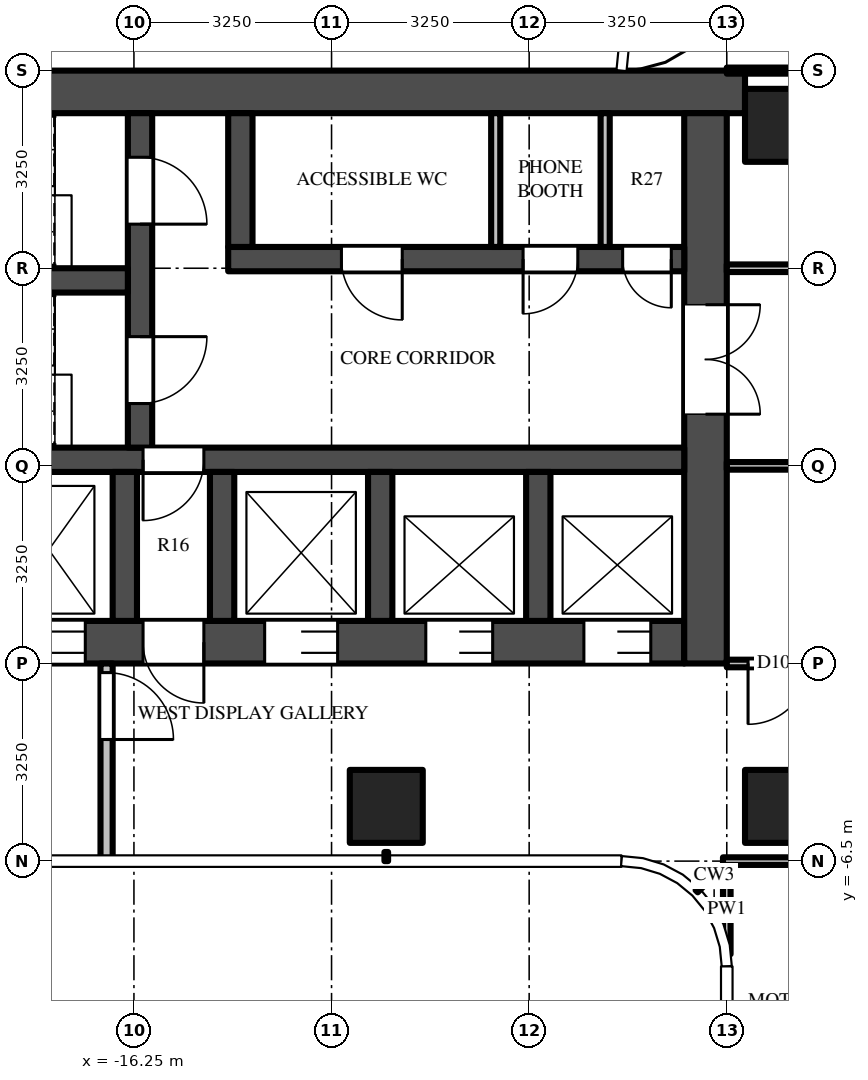
"""IFC4 building model, lengths in metres.
Left out: names, types, materials, properties, quantities, classifications, styles, units other than length and angle.
Written with IfcOpenShell. Run it as: python <this file> out.ifc"""

import sys

from ifc_helpers import new_model, si_unit, direction, frame, frame_2d, origin, origin_2d, place, context, subcontext, project, spatial, rectangle, extrude, source, transform, mapped, element, fill, save


model = new_model("IFC4")
c1 = context("Model", 3, precision=1e-05, world=origin(), true_north=direction((0.0, 1.0)))
c2 = subcontext(c1, "Body", "Model", "MODEL_VIEW")
j1 = project(units=[si_unit("LENGTHUNIT", "METRE"), si_unit("PLANEANGLEUNIT", "RADIAN")], contexts=[c1])
p1 = place(None, origin())
s1 = spatial("IfcSite", under=j1, at=p1, CompositionType="ELEMENT")
p2 = place(p1, origin())
s2 = spatial("IfcBuilding", under=s1, at=p2, CompositionType="ELEMENT")
p3 = place(p2, frame((0.0, 0.0, 189.3)))
s3 = spatial("IfcBuildingStorey", under=s2, at=p3, CompositionType="ELEMENT", Elevation=189.3)
m1 = source(origin(), c2, "Body", "SweptSolid", [
    extrude(rectangle(XDim=1.2, YDim=1.2, at=origin_2d()), origin(), (0.0, 0.0, 1.0), 3.9),
])
for number, where, z_axis, x_axis in (
    (1, (-5.6, 5.6, 0.0), (0.0, 0.0, 1.0), (1.0, 0.0, 0.0)),
    (2, (-5.6, -5.6, 0.0), (0.0, 0.0, 1.0), (1.0, 0.0, 0.0)),
    (3, (-12.1, -5.6, 0.0), (0.0, 0.0, 1.0), (1.0, 0.0, 0.0)),
):
    element("IfcColumn", number, at=place(p3, frame(where, z_axis=z_axis, x_axis=x_axis)), inside=s3, PredefinedType="COLUMN", context=c2, shape_type="MappedRepresentation", body=[
        mapped(m1, transform((0.0, 0.0, 0.0))),
    ])
m2 = source(origin(), c2, "Body", "SweptSolid", [
    extrude(rectangle(XDim=16.55, YDim=0.7, at=frame_2d((8.275, 0.0))), origin(), (0.0, 0.0, 1.0), 3.7),
])
p4 = place(p3, frame((-6.2, 6.15, 0.0), z_axis=(0.0, 0.0, 1.0), x_axis=(-1.0, 0.0, 0.0)))
e4 = element("IfcWall", 4, at=p4, inside=s3, PredefinedType="SHEAR", context=c2, shape_type="MappedRepresentation", body=[
    mapped(m2, transform((0.0, 0.0, 0.0))),
])
m3 = source(origin(), c2, "Body", "SweptSolid", [
    extrude(rectangle(XDim=14.85, YDim=0.7, at=frame_2d((7.425, 0.0))), origin(), (0.0, 0.0, 1.0), 3.7),
])
p5 = place(p3, frame((-7.2, -2.9, 0.0), z_axis=(0.0, 0.0, 1.0), x_axis=(-1.0, 0.0, 0.0)))
e5 = element("IfcWall", 5, at=p5, inside=s3, PredefinedType="SHEAR", context=c2, shape_type="MappedRepresentation", body=[
    mapped(m3, transform((0.0, 0.0, 0.0))),
])
m4 = source(origin(), c2, "Body", "SweptSolid", [
    extrude(rectangle(XDim=1.1, YDim=2.1, at=frame_2d((0.55, 1.05))), frame((0.0, 0.36, 0.0), z_axis=(0.0, -1.0, 0.0), x_axis=(1.0, 0.0, 0.0)), (0.0, 0.0, 1.0), 0.72),
])
p6 = place(p5, frame((0.55, 0.0, 0.0)))
e6 = element("IfcOpeningElement", 6, at=p6, cuts=e5, PredefinedType="OPENING", context=c2, shape_type="MappedRepresentation", body=[
    mapped(m4, transform((0.0, 0.0, 0.0))),
])
p7 = place(p5, frame((3.15, 0.0, 0.0)))
e7 = element("IfcOpeningElement", 7, at=p7, cuts=e5, PredefinedType="OPENING", context=c2, shape_type="MappedRepresentation", body=[
    mapped(m4, transform((0.0, 0.0, 0.0))),
])
m5 = source(origin(), c2, "Body", "SweptSolid", [
    extrude(rectangle(XDim=1.2, YDim=2.1, at=frame_2d((0.6, 1.05))), frame((0.0, 0.36, 0.0), z_axis=(0.0, -1.0, 0.0), x_axis=(1.0, 0.0, 0.0)), (0.0, 0.0, 1.0), 0.72),
])
p8 = place(p5, frame((5.7, 0.0, 0.0)))
e8 = element("IfcOpeningElement", 8, at=p8, cuts=e5, PredefinedType="OPENING", context=c2, shape_type="MappedRepresentation", body=[
    mapped(m5, transform((0.0, 0.0, 0.0))),
])
m6 = source(origin(), c2, "Body", "SweptSolid", [
    extrude(rectangle(XDim=1.3, YDim=2.1, at=frame_2d((0.65, 1.05))), frame((0.0, 0.36, 0.0), z_axis=(0.0, -1.0, 0.0), x_axis=(1.0, 0.0, 0.0)), (0.0, 0.0, 1.0), 0.72),
])
p9 = place(p5, frame((12.2, 0.0, 0.0)))
e9 = element("IfcOpeningElement", 9, at=p9, cuts=e5, PredefinedType="OPENING", context=c2, shape_type="MappedRepresentation", body=[
    mapped(m6, transform((0.0, 0.0, 0.0))),
])
p10 = place(p5, frame((9.85, 0.0, 0.0)))
e10 = element("IfcOpeningElement", 10, at=p10, cuts=e5, PredefinedType="OPENING", context=c2, shape_type="MappedRepresentation", body=[
    mapped(m5, transform((0.0, 0.0, 0.0))),
])
m7 = source(origin(), c2, "Body", "SweptSolid", [
    extrude(rectangle(XDim=1.0, YDim=2.1, at=frame_2d((0.5, 1.05))), frame((0.0, 0.36, 0.0), z_axis=(0.0, -1.0, 0.0), x_axis=(1.0, 0.0, 0.0)), (0.0, 0.0, 1.0), 0.72),
])
p11 = place(p5, frame((7.9, 0.0, 0.0)))
e11 = element("IfcOpeningElement", 11, at=p11, cuts=e5, PredefinedType="OPENING", context=c2, shape_type="MappedRepresentation", body=[
    mapped(m7, transform((0.0, 0.0, 0.0))),
])
m8 = source(origin(), c2, "Body", "SweptSolid", [
    extrude(rectangle(XDim=9.05, YDim=0.7, at=frame_2d((4.525, 0.0))), origin(), (0.0, 0.0, 1.0), 3.7),
])
p12 = place(p3, frame((-6.85, 5.8, 0.0), z_axis=(0.0, 0.0, 1.0), x_axis=(0.0, -1.0, 0.0)))
e12 = element("IfcWall", 12, at=p12, inside=s3, PredefinedType="SHEAR", context=c2, shape_type="MappedRepresentation", body=[
    mapped(m8, transform((0.0, 0.0, 0.0))),
])
m9 = source(origin(), c2, "Body", "SweptSolid", [
    extrude(rectangle(XDim=1.8, YDim=2.1, at=frame_2d((0.9, 1.05))), frame((0.0, 0.36, 0.0), z_axis=(0.0, -1.0, 0.0), x_axis=(1.0, 0.0, 0.0)), (0.0, 0.0, 1.0), 0.72),
])
p13 = place(p12, frame((3.15, 0.0, 0.0)))
e13 = element("IfcOpeningElement", 13, at=p13, cuts=e12, PredefinedType="OPENING", context=c2, shape_type="MappedRepresentation", body=[
    mapped(m9, transform((0.0, 0.0, 0.0))),
])
m10 = source(origin(), c2, "Body", "SweptSolid", [
    extrude(rectangle(XDim=7.5, YDim=0.4, at=frame_2d((3.75, 0.0))), origin(), (0.0, 0.0, 1.0), 3.7),
])
p14 = place(p3, frame((-7.2, 3.4, 0.0), z_axis=(0.0, 0.0, 1.0), x_axis=(-1.0, 0.0, 0.0)))
e14 = element("IfcWall", 14, at=p14, inside=s3, PredefinedType="SHEAR", context=c2, shape_type="MappedRepresentation", body=[
    mapped(m10, transform((0.0, 0.0, 0.0))),
])
m11 = source(origin(), c2, "Body", "SweptSolid", [
    extrude(rectangle(XDim=0.8, YDim=2.1, at=frame_2d((0.4, 1.05))), frame((0.0, 0.21, 0.0), z_axis=(0.0, -1.0, 0.0), x_axis=(1.0, 0.0, 0.0)), (0.0, 0.0, 1.0), 0.42),
])
p15 = place(p14, frame((0.212, 0.0, 0.0)))
e15 = element("IfcOpeningElement", 15, at=p15, cuts=e14, PredefinedType="OPENING", context=c2, shape_type="MappedRepresentation", body=[
    mapped(m11, transform((0.0, 0.0, 0.0))),
])
m12 = source(origin(), c2, "Body", "SweptSolid", [
    extrude(rectangle(XDim=0.9, YDim=2.1, at=frame_2d((0.45, 1.05))), frame((0.0, 0.21, 0.0), z_axis=(0.0, -1.0, 0.0), x_axis=(1.0, 0.0, 0.0)), (0.0, 0.0, 1.0), 0.42),
])
p16 = place(p14, frame((1.75, 0.0, 0.0)))
e16 = element("IfcOpeningElement", 16, at=p16, cuts=e14, PredefinedType="OPENING", context=c2, shape_type="MappedRepresentation", body=[
    mapped(m12, transform((0.0, 0.0, 0.0))),
])
m13 = source(origin(), c2, "Body", "SweptSolid", [
    extrude(rectangle(XDim=1.0, YDim=2.1, at=frame_2d((0.5, 1.05))), frame((0.0, 0.21, 0.0), z_axis=(0.0, -1.0, 0.0), x_axis=(1.0, 0.0, 0.0)), (0.0, 0.0, 1.0), 0.42),
])
p17 = place(p14, frame((4.637, 0.0, 0.0)))
e17 = element("IfcOpeningElement", 17, at=p17, cuts=e14, PredefinedType="OPENING", context=c2, shape_type="MappedRepresentation", body=[
    mapped(m13, transform((0.0, 0.0, 0.0))),
])
m14 = source(origin(), c2, "Body", "SweptSolid", [
    extrude(rectangle(XDim=14.85, YDim=0.4, at=frame_2d((7.425, 0.0))), origin(), (0.0, 0.0, 1.0), 3.7),
])
p18 = place(p3, frame((-7.2, 0.1, 0.0), z_axis=(0.0, 0.0, 1.0), x_axis=(-1.0, 0.0, 0.0)))
e18 = element("IfcWall", 18, at=p18, inside=s3, PredefinedType="SHEAR", context=c2, shape_type="MappedRepresentation", body=[
    mapped(m14, transform((0.0, 0.0, 0.0))),
])
p19 = place(p18, frame((7.9, 0.0, 0.0)))
e19 = element("IfcOpeningElement", 19, at=p19, cuts=e18, PredefinedType="OPENING", context=c2, shape_type="MappedRepresentation", body=[
    mapped(m13, transform((0.0, 0.0, 0.0))),
])
m15 = source(origin(), c2, "Body", "SweptSolid", [
    extrude(rectangle(XDim=5.5, YDim=0.4, at=frame_2d((2.75, 0.0))), origin(), (0.0, 0.0, 1.0), 3.7),
])
p20 = place(p3, frame((-16.15, 5.8, 0.0), z_axis=(0.0, 0.0, 1.0), x_axis=(0.0, -1.0, 0.0)))
e20 = element("IfcWall", 20, at=p20, inside=s3, PredefinedType="SHEAR", context=c2, shape_type="MappedRepresentation", body=[
    mapped(m15, transform((0.0, 0.0, 0.0))),
])
m16 = source(origin(), c2, "Body", "SweptSolid", [
    extrude(rectangle(XDim=1.1, YDim=2.1, at=frame_2d((0.55, 1.05))), frame((0.0, 0.21, 0.0), z_axis=(0.0, -1.0, 0.0), x_axis=(1.0, 0.0, 0.0)), (0.0, 0.0, 1.0), 0.42),
])
p21 = place(p20, frame((0.725, 0.0, 0.0)))
e21 = element("IfcOpeningElement", 21, at=p21, cuts=e20, PredefinedType="OPENING", context=c2, shape_type="MappedRepresentation", body=[
    mapped(m16, transform((0.0, 0.0, 0.0))),
])
p22 = place(p20, frame((3.675, 0.0, 0.0)))
e22 = element("IfcOpeningElement", 22, at=p22, cuts=e20, PredefinedType="OPENING", context=c2, shape_type="MappedRepresentation", body=[
    mapped(m16, transform((0.0, 0.0, 0.0))),
])
m17 = source(origin(), c2, "Body", "SweptSolid", [
    extrude(rectangle(XDim=5.7, YDim=0.4, at=frame_2d((2.85, 0.0))), origin(), (0.0, 0.0, 1.0), 3.7),
])
p23 = place(p3, frame((-16.35, 3.05, 0.0), z_axis=(0.0, 0.0, 1.0), x_axis=(-1.0, 0.0, 0.0)))
e23 = element("IfcWall", 23, at=p23, inside=s3, PredefinedType="SHEAR", context=c2, shape_type="MappedRepresentation", body=[
    mapped(m17, transform((0.0, 0.0, 0.0))),
])
m18 = source(origin(), c2, "Body", "SweptSolid", [
    extrude(rectangle(XDim=2.2, YDim=0.4, at=frame_2d((1.1, 0.0))), origin(), (0.0, 0.0, 1.0), 3.7),
])
p24 = place(p3, frame((-14.5, 5.8, 0.0), z_axis=(0.0, 0.0, 1.0), x_axis=(0.0, -1.0, 0.0)))
e24 = element("IfcWall", 24, at=p24, inside=s3, PredefinedType="SHEAR", context=c2, shape_type="MappedRepresentation", body=[
    mapped(m18, transform((0.0, 0.0, 0.0))),
])
m19 = source(origin(), c2, "Body", "SweptSolid", [
    extrude(rectangle(XDim=2.45, YDim=0.4, at=frame_2d((1.225, 0.0))), origin(), (0.0, 0.0, 1.0), 3.7),
])
for number, where, z_axis, x_axis in (
    (25, (-9.6, -0.1, 0.0), (0.0, 0.0, 1.0), (0.0, -1.0, 0.0)),
    (26, (-12.2, -0.1, 0.0), (0.0, 0.0, 1.0), (0.0, -1.0, 0.0)),
    (27, (-14.8, -0.1, 0.0), (0.0, 0.0, 1.0), (0.0, -1.0, 0.0)),
    (28, (-16.4, -0.1, 0.0), (0.0, 0.0, 1.0), (0.0, -1.0, 0.0)),
):
    element("IfcWall", number, at=place(p3, frame(where, z_axis=z_axis, x_axis=x_axis)), inside=s3, PredefinedType="SHEAR", context=c2, shape_type="MappedRepresentation", body=[
        mapped(m19, transform((0.0, 0.0, 0.0))),
    ])
m20 = source(origin(), c2, "Body", "SweptSolid", [
    extrude(rectangle(XDim=3.25, YDim=0.2, at=frame_2d((1.625, 0.0))), origin(), (0.0, 0.0, 1.0), 3.7),
])
p25 = place(p3, frame((-16.7, -3.25, 0.0), z_axis=(0.0, 0.0, 1.0), x_axis=(0.0, -1.0, 0.0)))
e29 = element("IfcWall", 29, at=p25, inside=s3, PredefinedType="PARTITIONING", context=c2, shape_type="MappedRepresentation", body=[
    mapped(m20, transform((0.0, 0.0, 0.0))),
])
m21 = source(origin(), c2, "Body", "SweptSolid", [
    extrude(rectangle(XDim=1.1, YDim=2.1, at=frame_2d((0.55, 1.05))), frame((0.0, 0.11, 0.0), z_axis=(0.0, -1.0, 0.0), x_axis=(1.0, 0.0, 0.0)), (0.0, 0.0, 1.0), 0.22),
])
p26 = place(p25, frame((0.15, 0.0, 0.0)))
e30 = element("IfcOpeningElement", 30, at=p26, cuts=e29, PredefinedType="OPENING", context=c2, shape_type="MappedRepresentation", body=[
    mapped(m21, transform((0.0, 0.0, 0.0))),
])
m22 = source(origin(), c2, "Body", "SweptSolid", [
    extrude(rectangle(XDim=2.2, YDim=0.15, at=frame_2d((1.1, 0.0))), origin(), (0.0, 0.0, 1.0), 3.7),
])
for number, where, z_axis, x_axis in (
    (31, (-8.5, 5.8, 0.0), (0.0, 0.0, 1.0), (0.0, -1.0, 0.0)),
    (32, (-10.3, 5.8, 0.0), (0.0, 0.0, 1.0), (0.0, -1.0, 0.0)),
):
    element("IfcWall", number, at=place(p3, frame(where, z_axis=z_axis, x_axis=x_axis)), inside=s3, PredefinedType="PARTITIONING", context=c2, shape_type="MappedRepresentation", body=[
        mapped(m22, transform((0.0, 0.0, 0.0))),
    ])
m23 = source(origin(), c2, "Body", "SweptSolid", [
    extrude(rectangle(XDim=1.469, YDim=0.125, at=frame_2d((0.734, 0.0))), origin(), (0.0, 0.0, 1.0), 3.7),
])
p27 = place(p3, frame((-6.5, -6.562, 0.0), z_axis=(0.0, 0.0, 1.0), x_axis=(0.0, -1.0, 0.0)))
e33 = element("IfcWall", 33, at=p27, inside=s3, PredefinedType="PARTITIONING", context=c2, shape_type="MappedRepresentation", body=[
    mapped(m23, transform((0.0, 0.0, 0.0))),
])
m24 = source(origin(), c2, "Body", "SweptSolid", [
    extrude(rectangle(XDim=3.725, YDim=0.125, at=frame_2d((1.863, 0.0))), origin(), (0.0, 0.0, 1.0), 2.78),
])
p28 = place(p3, frame((-2.837, -6.5, 0.0), z_axis=(0.0, 0.0, 1.0), x_axis=(-1.0, 0.0, 0.0)))
e34 = element("IfcWall", 34, at=p28, inside=s3, PredefinedType="PARTITIONING", context=c2, shape_type="MappedRepresentation", body=[
    mapped(m24, transform((0.0, 0.0, 0.0))),
])
m25 = source(origin(), c2, "Body", "SweptSolid", [
    extrude(rectangle(XDim=5.363, YDim=0.125, at=frame_2d((2.681, 0.0))), origin(), (0.0, 0.0, 1.0), 2.996),
])
p29 = place(p3, frame((-1.137, -3.25, 0.0), z_axis=(0.0, 0.0, 1.0), x_axis=(-1.0, 0.0, 0.0)))
e35 = element("IfcWall", 35, at=p29, inside=s3, PredefinedType="PARTITIONING", context=c2, shape_type="MappedRepresentation", body=[
    mapped(m25, transform((0.0, 0.0, 0.0))),
])
m26 = source(origin(), c2, "Body", "SweptSolid", [
    extrude(rectangle(XDim=1.0, YDim=2.1, at=frame_2d((0.5, 1.05))), frame((0.0, 0.073, 0.0), z_axis=(0.0, -1.0, 0.0), x_axis=(1.0, 0.0, 0.0)), (0.0, 0.0, 1.0), 0.145),
])
p30 = place(p29, frame((4.012, 0.0, 0.0)))
e36 = element("IfcOpeningElement", 36, at=p30, cuts=e35, PredefinedType="OPENING", context=c2, shape_type="MappedRepresentation", body=[
    mapped(m26, transform((0.0, 0.0, 0.0))),
])
p31 = place(p3, frame((-1.137, 0.0, 0.0), z_axis=(0.0, 0.0, 1.0), x_axis=(-1.0, 0.0, 0.0)))
e37 = element("IfcWall", 37, at=p31, inside=s3, PredefinedType="PARTITIONING", context=c2, shape_type="MappedRepresentation", body=[
    mapped(m25, transform((0.0, 0.0, 0.0))),
])
p32 = place(p3, frame((-6.5, 3.25, 0.0), z_axis=(0.0, 0.0, 1.0), x_axis=(1.0, 0.0, 0.0)))
e38 = element("IfcWall", 38, at=p32, inside=s3, PredefinedType="PARTITIONING", context=c2, shape_type="MappedRepresentation", body=[
    mapped(m25, transform((0.0, 0.0, 0.0))),
])
p33 = place(p32, frame((3.95, 0.0, 0.0)))
e39 = element("IfcOpeningElement", 39, at=p33, cuts=e38, PredefinedType="OPENING", context=c2, shape_type="MappedRepresentation", body=[
    mapped(m26, transform((0.0, 0.0, 0.0))),
])
m27 = source(origin(), c2, "Body", "SweptSolid", [
    extrude(rectangle(XDim=5.363, YDim=0.1, at=frame_2d((2.681, 0.0))), origin(), (0.0, 0.0, 1.0), 2.78),
])
p34 = place(p3, frame((-6.5, 6.5, 0.0), z_axis=(0.0, 0.0, 1.0), x_axis=(1.0, 0.0, 0.0)))
e40 = element("IfcWall", 40, at=p34, inside=s3, PredefinedType="PARTITIONING", context=c2, shape_type="MappedRepresentation", body=[
    mapped(m27, transform((0.0, 0.0, 0.0))),
])
m28 = source(origin(), c2, "Body", "SweptSolid", [
    extrude(rectangle(XDim=1.1, YDim=2.1, at=frame_2d((0.55, 1.05))), frame((0.0, -0.275, 0.0), z_axis=(0.0, -1.0, 0.0), x_axis=(1.0, 0.0, 0.0)), (0.0, 0.0, 1.0), 0.05),
])
p35 = place(p6, origin())
e41 = element("IfcDoor", 41, at=p35, inside=s3, OperationType="DOUBLE_DOOR_SLIDING", PredefinedType="DOOR", context=c2, shape_type="MappedRepresentation", body=[
    mapped(m28, transform((0.0, 0.0, 0.0))),
])
fill(e6, e41)
p36 = place(p7, origin())
e42 = element("IfcDoor", 42, at=p36, inside=s3, OperationType="DOUBLE_DOOR_SLIDING", PredefinedType="DOOR", context=c2, shape_type="MappedRepresentation", body=[
    mapped(m28, transform((0.0, 0.0, 0.0))),
])
fill(e7, e42)
m29 = source(origin(), c2, "Body", "SweptSolid", [
    extrude(rectangle(XDim=1.2, YDim=2.1, at=frame_2d((0.6, 1.05))), frame((0.0, -0.275, 0.0), z_axis=(0.0, -1.0, 0.0), x_axis=(1.0, 0.0, 0.0)), (0.0, 0.0, 1.0), 0.05),
])
p37 = place(p8, origin())
e43 = element("IfcDoor", 43, at=p37, inside=s3, OperationType="DOUBLE_DOOR_SLIDING", PredefinedType="DOOR", context=c2, shape_type="MappedRepresentation", body=[
    mapped(m29, transform((0.0, 0.0, 0.0))),
])
fill(e8, e43)
p38 = place(p10, origin())
e44 = element("IfcDoor", 44, at=p38, inside=s3, OperationType="DOUBLE_DOOR_SLIDING", PredefinedType="DOOR", context=c2, shape_type="MappedRepresentation", body=[
    mapped(m29, transform((0.0, 0.0, 0.0))),
])
fill(e10, e44)
m30 = source(origin(), c2, "Body", "SweptSolid", [
    extrude(rectangle(XDim=1.8, YDim=2.1, at=frame_2d((0.9, 1.05))), frame((0.0, -0.275, 0.0), z_axis=(0.0, -1.0, 0.0), x_axis=(1.0, 0.0, 0.0)), (0.0, 0.0, 1.0), 0.05),
])
p39 = place(p13, origin())
e45 = element("IfcDoor", 45, at=p39, inside=s3, OperationType="DOUBLE_DOOR_SINGLE_SWING", PredefinedType="DOOR", context=c2, shape_type="MappedRepresentation", body=[
    mapped(m30, transform((0.0, 0.0, 0.0))),
])
fill(e13, e45)
m31 = source(origin(), c2, "Body", "SweptSolid", [
    extrude(rectangle(XDim=1.1, YDim=2.1, at=frame_2d((0.55, 1.05))), frame((0.0, 0.025, 0.0), z_axis=(0.0, -1.0, 0.0), x_axis=(1.0, 0.0, 0.0)), (0.0, 0.0, 1.0), 0.05),
])
p40 = place(p21, origin())
e46 = element("IfcDoor", 46, at=p40, inside=s3, OperationType="SINGLE_SWING_RIGHT", PredefinedType="DOOR", context=c2, shape_type="MappedRepresentation", body=[
    mapped(m31, transform((0.0, 0.0, 0.0))),
])
fill(e21, e46)
p41 = place(p22, origin())
e47 = element("IfcDoor", 47, at=p41, inside=s3, OperationType="SINGLE_SWING_LEFT", PredefinedType="DOOR", context=c2, shape_type="MappedRepresentation", body=[
    mapped(m31, transform((0.0, 0.0, 0.0))),
])
fill(e22, e47)
m32 = source(origin(), c2, "Body", "SweptSolid", [
    extrude(rectangle(XDim=1.0, YDim=2.1, at=frame_2d((0.5, 1.05))), frame((0.0, 0.025, 0.0), z_axis=(0.0, -1.0, 0.0), x_axis=(1.0, 0.0, 0.0)), (0.0, 0.0, 1.0), 0.05),
])
p42 = place(p19, origin())
e48 = element("IfcDoor", 48, at=p42, inside=s3, OperationType="SINGLE_SWING_RIGHT", PredefinedType="DOOR", context=c2, shape_type="MappedRepresentation", body=[
    mapped(m32, transform((0.0, 0.0, 0.0))),
])
fill(e19, e48)
m33 = source(origin(), c2, "Body", "SweptSolid", [
    extrude(rectangle(XDim=1.0, YDim=2.1, at=frame_2d((0.5, 1.05))), frame((0.0, -0.275, 0.0), z_axis=(0.0, -1.0, 0.0), x_axis=(1.0, 0.0, 0.0)), (0.0, 0.0, 1.0), 0.05),
])
p43 = place(p11, origin())
e49 = element("IfcDoor", 49, at=p43, inside=s3, OperationType="SINGLE_SWING_LEFT", PredefinedType="DOOR", context=c2, shape_type="MappedRepresentation", body=[
    mapped(m33, transform((0.0, 0.0, 0.0))),
])
fill(e11, e49)
p44 = place(p26, origin())
e50 = element("IfcDoor", 50, at=p44, inside=s3, OperationType="SINGLE_SWING_RIGHT", PredefinedType="DOOR", context=c2, shape_type="MappedRepresentation", body=[
    mapped(m31, transform((0.0, 0.0, 0.0))),
])
fill(e30, e50)
m34 = source(origin(), c2, "Body", "SweptSolid", [
    extrude(rectangle(XDim=0.8, YDim=2.1, at=frame_2d((0.4, 1.05))), frame((0.0, 0.025, 0.0), z_axis=(0.0, -1.0, 0.0), x_axis=(1.0, 0.0, 0.0)), (0.0, 0.0, 1.0), 0.05),
])
p45 = place(p15, origin())
e51 = element("IfcDoor", 51, at=p45, inside=s3, OperationType="SINGLE_SWING_LEFT", PredefinedType="DOOR", context=c2, shape_type="MappedRepresentation", body=[
    mapped(m34, transform((0.0, 0.0, 0.0))),
])
fill(e15, e51)
m35 = source(origin(), c2, "Body", "SweptSolid", [
    extrude(rectangle(XDim=0.9, YDim=2.1, at=frame_2d((0.45, 1.05))), frame((0.0, 0.025, 0.0), z_axis=(0.0, -1.0, 0.0), x_axis=(1.0, 0.0, 0.0)), (0.0, 0.0, 1.0), 0.05),
])
p46 = place(p16, origin())
e52 = element("IfcDoor", 52, at=p46, inside=s3, OperationType="SINGLE_SWING_RIGHT", PredefinedType="DOOR", context=c2, shape_type="MappedRepresentation", body=[
    mapped(m35, transform((0.0, 0.0, 0.0))),
])
fill(e16, e52)
p47 = place(p17, origin())
e53 = element("IfcDoor", 53, at=p47, inside=s3, OperationType="SINGLE_SWING_LEFT", PredefinedType="DOOR", context=c2, shape_type="MappedRepresentation", body=[
    mapped(m32, transform((0.0, 0.0, 0.0))),
])
fill(e17, e53)
p48 = place(p30, origin())
e54 = element("IfcDoor", 54, at=p48, inside=s3, OperationType="SINGLE_SWING_RIGHT", PredefinedType="DOOR", context=c2, shape_type="MappedRepresentation", body=[
    mapped(m32, transform((0.0, 0.0, 0.0))),
])
fill(e36, e54)
save(model, sys.argv[1])
